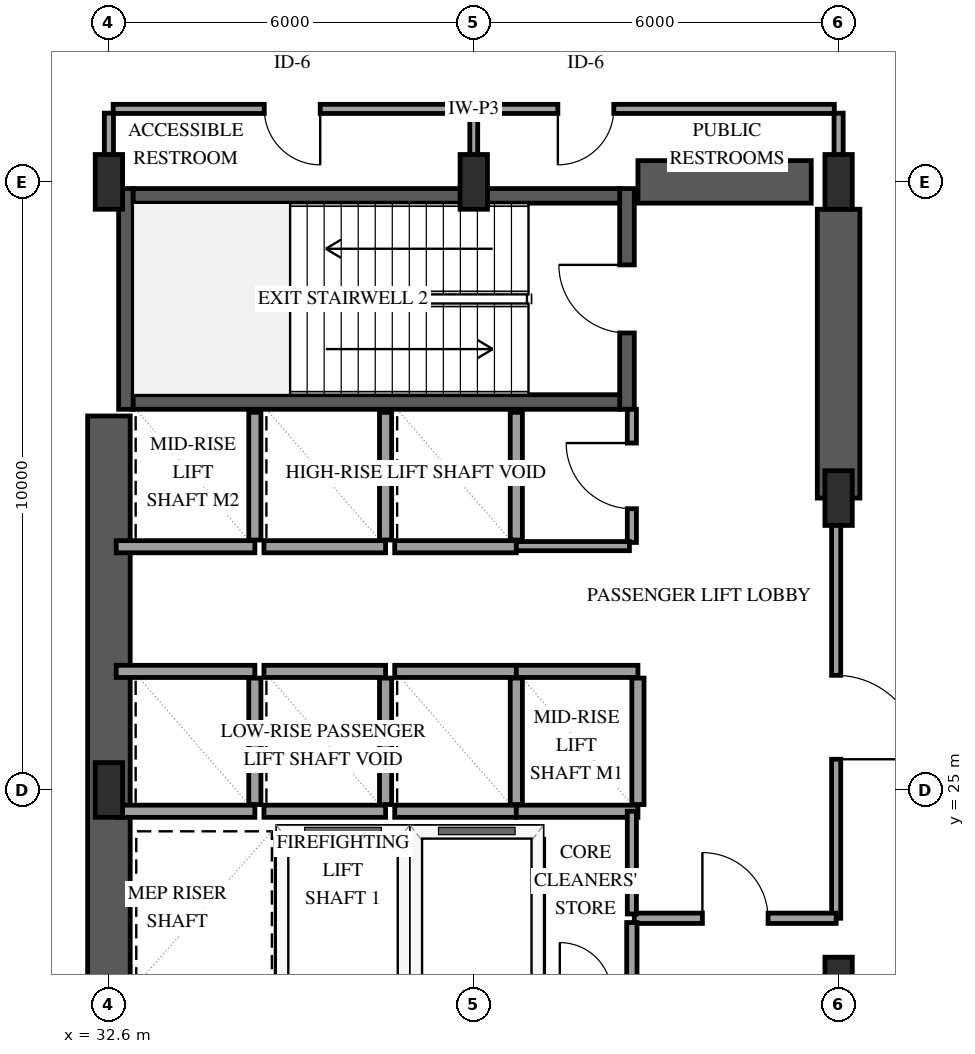
"""IFC4 building model, lengths in metres.
Left out: names, types, materials, properties, quantities, classifications, styles, units other than length and angle.
Written with IfcOpenShell. Run it as: python <this file> out.ifc"""

import sys

from ifc_helpers import new_model, si_unit, direction, frame, frame_2d, origin, origin_2d, place, context, subcontext, project, spatial, rectangle, extrude, element, fill, save


model = new_model("IFC4")
c1 = context("Model", 3, precision=1e-05, world=origin(), true_north=direction((0.0, 1.0)))
c2 = subcontext(c1, "Body", "Model", "MODEL_VIEW")
j1 = project(units=[si_unit("LENGTHUNIT", "METRE"), si_unit("PLANEANGLEUNIT", "RADIAN")], contexts=[c1])
p1 = place(None, origin())
s1 = spatial("IfcSite", under=j1, at=p1, CompositionType="ELEMENT")
p2 = place(p1, origin())
s2 = spatial("IfcBuilding", under=s1, at=p2, CompositionType="ELEMENT")
p3 = place(p2, frame((0.0, 0.0, 6.0)))
s3 = spatial("IfcBuildingStorey", under=s2, at=p3, CompositionType="ELEMENT", Elevation=6.0)
p4 = place(p3, frame((32.88, 31.26, 0.0), z_axis=(0.0, 0.0, 1.0), x_axis=(0.0, 1.0, 0.0)))
e1 = element("IfcWall", 1, at=p4, inside=s3, PredefinedType="SHEAR", context=c2, shape_type="SweptSolid", body=[
    extrude(rectangle(XDim=3.63, YDim=0.24, at=frame_2d((1.815, 0.0))), origin(), (0.0, 0.0, 1.0), 5.4),
])
p5 = place(p3, frame((41.12, 31.26, 0.0), z_axis=(0.0, 0.0, 1.0), x_axis=(0.0, 1.0, 0.0)))
e2 = element("IfcWall", 2, at=p5, inside=s3, PredefinedType="SHEAR", context=c2, shape_type="SweptSolid", body=[
    extrude(rectangle(XDim=3.63, YDim=0.24, at=frame_2d((1.815, 0.0))), origin(), (0.0, 0.0, 1.0), 5.4),
])
p6 = place(p5, frame((1.255, 0.0, 0.0)))
e3 = element("IfcOpeningElement", 3, at=p6, cuts=e2, PredefinedType="OPENING", context=c2, shape_type="SweptSolid", body=[
    extrude(rectangle(XDim=1.12, YDim=2.15, at=frame_2d((0.56, 1.075))), frame((0.0, 0.13, 0.0), z_axis=(0.0, -1.0, 0.0), x_axis=(1.0, 0.0, 0.0)), (0.0, 0.0, 1.0), 0.26),
])
for number, where, z_axis, x_axis in (
    (4, (33.0, 31.38, 0.0), (0.0, 0.0, 1.0), (1.0, 0.0, 0.0)),
    (5, (33.0, 34.77, 0.0), (0.0, 0.0, 1.0), (1.0, 0.0, 0.0)),
):
    element("IfcWall", number, at=place(p3, frame(where, z_axis=z_axis, x_axis=x_axis)), inside=s3, PredefinedType="SHEAR", context=c2, shape_type="SweptSolid", body=[
        extrude(rectangle(XDim=8.0, YDim=0.24, at=frame_2d((4.0, 0.0))), origin(), (0.0, 0.0, 1.0), 5.4),
    ])
p7 = place(p3, frame((32.6, 18.85, 0.0), z_axis=(0.0, 0.0, 1.0), x_axis=(0.0, 1.0, 0.0)))
e6 = element("IfcWall", 6, at=p7, inside=s3, PredefinedType="SHEAR", context=c2, shape_type="SweptSolid", body=[
    extrude(rectangle(XDim=12.3, YDim=0.7, at=frame_2d((6.15, 0.0))), origin(), (0.0, 0.0, 1.0), 5.4),
])
p8 = place(p3, frame((41.3, 35.0, 0.0), z_axis=(0.0, 0.0, 1.0), x_axis=(1.0, 0.0, 0.0)))
e7 = element("IfcWall", 7, at=p8, inside=s3, PredefinedType="SHEAR", context=c2, shape_type="SweptSolid", body=[
    extrude(rectangle(XDim=2.85, YDim=0.7, at=frame_2d((1.425, 0.0))), origin(), (0.0, 0.0, 1.0), 5.4),
])
p9 = place(p3, frame((44.6, 29.8, 0.0), z_axis=(0.0, 0.0, 1.0), x_axis=(0.0, 1.0, 0.0)))
e8 = element("IfcWall", 8, at=p9, inside=s3, PredefinedType="SHEAR", context=c2, shape_type="SweptSolid", body=[
    extrude(rectangle(XDim=4.75, YDim=0.7, at=frame_2d((2.375, 0.0))), origin(), (0.0, 0.0, 1.0), 5.4),
])
for number, where, z_axis, x_axis in (
    (9, (32.6, 25.0, 0.0), (0.0, 0.0, 1.0), (1.0, 0.0, 0.0)),
    (10, (32.6, 35.0, 0.0), (0.0, 0.0, 1.0), (1.0, 0.0, 0.0)),
    (11, (38.6, 35.0, 0.0), (0.0, 0.0, 1.0), (1.0, 0.0, 0.0)),
    (12, (44.6, 21.8, 0.0), (0.0, 0.0, 1.0), (1.0, 0.0, 0.0)),
    (13, (44.6, 29.8, 0.0), (0.0, 0.0, 1.0), (1.0, 0.0, 0.0)),
    (14, (44.6, 35.0, 0.0), (0.0, 0.0, 1.0), (1.0, 0.0, 0.0)),
):
    element("IfcColumn", number, at=place(p3, frame(where, z_axis=z_axis, x_axis=x_axis)), inside=s3, PredefinedType="PILASTER", context=c2, shape_type="SweptSolid", body=[
        extrude(rectangle(XDim=0.45, YDim=0.9, at=origin_2d()), origin(), (0.0, 0.0, 1.0), 5.4),
    ])
p10 = place(p3, frame((35.45, 24.3, 0.0), z_axis=(0.0, 0.0, 1.0), x_axis=(1.0, 0.0, 0.0)))
e15 = element("IfcWall", 15, at=p10, inside=s3, PredefinedType="SOLIDWALL", context=c2, shape_type="SweptSolid", body=[
    extrude(rectangle(XDim=2.0, YDim=0.2, at=frame_2d((1.0, 0.0))), origin(), (0.0, 0.0, 1.0), 5.08),
])
for number, where, z_axis, x_axis in (
    (16, (35.45, 21.81, 0.0), (0.0, 0.0, 1.0), (0.0, 1.0, 0.0)),
    (17, (37.45, 21.81, 0.0), (0.0, 0.0, 1.0), (0.0, 1.0, 0.0)),
):
    element("IfcWall", number, at=place(p3, frame(where, z_axis=z_axis, x_axis=x_axis)), inside=s3, PredefinedType="SOLIDWALL", context=c2, shape_type="SweptSolid", body=[
        extrude(rectangle(XDim=2.38, YDim=0.2, at=frame_2d((1.19, 0.0))), origin(), (0.0, 0.0, 1.0), 5.08),
    ])
p11 = place(p3, frame((37.65, 24.3, 0.0), z_axis=(0.0, 0.0, 1.0), x_axis=(1.0, 0.0, 0.0)))
e18 = element("IfcWall", 18, at=p11, inside=s3, PredefinedType="SOLIDWALL", context=c2, shape_type="SweptSolid", body=[
    extrude(rectangle(XDim=2.0, YDim=0.2, at=frame_2d((1.0, 0.0))), origin(), (0.0, 0.0, 1.0), 5.08),
])
p12 = place(p3, frame((39.65, 21.81, 0.0), z_axis=(0.0, 0.0, 1.0), x_axis=(0.0, 1.0, 0.0)))
e19 = element("IfcWall", 19, at=p12, inside=s3, PredefinedType="SOLIDWALL", context=c2, shape_type="SweptSolid", body=[
    extrude(rectangle(XDim=2.38, YDim=0.2, at=frame_2d((1.19, 0.0))), origin(), (0.0, 0.0, 1.0), 5.08),
])
for number, where, z_axis, x_axis in (
    (20, (32.72, 24.65, 0.0), (0.0, 0.0, 1.0), (1.0, 0.0, 0.0)),
    (21, (32.72, 26.95, 0.0), (0.0, 0.0, 1.0), (1.0, 0.0, 0.0)),
):
    element("IfcWall", number, at=place(p3, frame(where, z_axis=z_axis, x_axis=x_axis)), inside=s3, PredefinedType="SOLIDWALL", context=c2, shape_type="SweptSolid", body=[
        extrude(rectangle(XDim=2.28, YDim=0.2, at=frame_2d((1.14, 0.0))), origin(), (0.0, 0.0, 1.0), 5.08),
    ])
p13 = place(p3, frame((35.0, 24.76, 0.0), z_axis=(0.0, 0.0, 1.0), x_axis=(0.0, 1.0, 0.0)))
e22 = element("IfcWall", 22, at=p13, inside=s3, PredefinedType="SOLIDWALL", context=c2, shape_type="SweptSolid", body=[
    extrude(rectangle(XDim=2.08, YDim=0.2, at=frame_2d((1.04, 0.0))), origin(), (0.0, 0.0, 1.0), 5.08),
])
for number, where, z_axis, x_axis in (
    (23, (35.15, 24.65, 0.0), (0.0, 0.0, 1.0), (1.0, 0.0, 0.0)),
    (24, (35.15, 26.95, 0.0), (0.0, 0.0, 1.0), (1.0, 0.0, 0.0)),
):
    element("IfcWall", number, at=place(p3, frame(where, z_axis=z_axis, x_axis=x_axis)), inside=s3, PredefinedType="SOLIDWALL", context=c2, shape_type="SweptSolid", body=[
        extrude(rectangle(XDim=2.0, YDim=0.2, at=frame_2d((1.0, 0.0))), origin(), (0.0, 0.0, 1.0), 5.08),
    ])
p14 = place(p3, frame((37.15, 24.76, 0.0), z_axis=(0.0, 0.0, 1.0), x_axis=(0.0, 1.0, 0.0)))
e25 = element("IfcWall", 25, at=p14, inside=s3, PredefinedType="SOLIDWALL", context=c2, shape_type="SweptSolid", body=[
    extrude(rectangle(XDim=2.08, YDim=0.2, at=frame_2d((1.04, 0.0))), origin(), (0.0, 0.0, 1.0), 5.08),
])
for number, where, z_axis, x_axis in (
    (26, (37.3, 24.65, 0.0), (0.0, 0.0, 1.0), (1.0, 0.0, 0.0)),
    (27, (37.3, 26.95, 0.0), (0.0, 0.0, 1.0), (1.0, 0.0, 0.0)),
):
    element("IfcWall", number, at=place(p3, frame(where, z_axis=z_axis, x_axis=x_axis)), inside=s3, PredefinedType="SOLIDWALL", context=c2, shape_type="SweptSolid", body=[
        extrude(rectangle(XDim=2.0, YDim=0.2, at=frame_2d((1.0, 0.0))), origin(), (0.0, 0.0, 1.0), 5.08),
    ])
p15 = place(p3, frame((39.3, 24.76, 0.0), z_axis=(0.0, 0.0, 1.0), x_axis=(0.0, 1.0, 0.0)))
e28 = element("IfcWall", 28, at=p15, inside=s3, PredefinedType="SOLIDWALL", context=c2, shape_type="SweptSolid", body=[
    extrude(rectangle(XDim=2.08, YDim=0.2, at=frame_2d((1.04, 0.0))), origin(), (0.0, 0.0, 1.0), 5.08),
])
for number, where, z_axis, x_axis in (
    (29, (39.3, 24.65, 0.0), (0.0, 0.0, 1.0), (1.0, 0.0, 0.0)),
    (30, (39.3, 26.95, 0.0), (0.0, 0.0, 1.0), (1.0, 0.0, 0.0)),
):
    element("IfcWall", number, at=place(p3, frame(where, z_axis=z_axis, x_axis=x_axis)), inside=s3, PredefinedType="SOLIDWALL", context=c2, shape_type="SweptSolid", body=[
        extrude(rectangle(XDim=2.0, YDim=0.2, at=frame_2d((1.0, 0.0))), origin(), (0.0, 0.0, 1.0), 5.08),
    ])
p16 = place(p3, frame((41.3, 24.76, 0.0), z_axis=(0.0, 0.0, 1.0), x_axis=(0.0, 1.0, 0.0)))
e31 = element("IfcWall", 31, at=p16, inside=s3, PredefinedType="SOLIDWALL", context=c2, shape_type="SweptSolid", body=[
    extrude(rectangle(XDim=2.08, YDim=0.2, at=frame_2d((1.04, 0.0))), origin(), (0.0, 0.0, 1.0), 5.08),
])
p17 = place(p3, frame((32.72, 29.0, 0.0), z_axis=(0.0, 0.0, 1.0), x_axis=(1.0, 0.0, 0.0)))
e32 = element("IfcWall", 32, at=p17, inside=s3, PredefinedType="SOLIDWALL", context=c2, shape_type="SweptSolid", body=[
    extrude(rectangle(XDim=2.28, YDim=0.2, at=frame_2d((1.14, 0.0))), origin(), (0.0, 0.0, 1.0), 5.08),
])
p18 = place(p3, frame((35.0, 29.11, 0.0), z_axis=(0.0, 0.0, 1.0), x_axis=(0.0, 1.0, 0.0)))
e33 = element("IfcWall", 33, at=p18, inside=s3, PredefinedType="SOLIDWALL", context=c2, shape_type="SweptSolid", body=[
    extrude(rectangle(XDim=2.1, YDim=0.2, at=frame_2d((1.05, 0.0))), origin(), (0.0, 0.0, 1.0), 5.08),
])
p19 = place(p3, frame((35.15, 29.0, 0.0), z_axis=(0.0, 0.0, 1.0), x_axis=(1.0, 0.0, 0.0)))
e34 = element("IfcWall", 34, at=p19, inside=s3, PredefinedType="SOLIDWALL", context=c2, shape_type="SweptSolid", body=[
    extrude(rectangle(XDim=2.0, YDim=0.2, at=frame_2d((1.0, 0.0))), origin(), (0.0, 0.0, 1.0), 5.08),
])
p20 = place(p3, frame((37.15, 29.11, 0.0), z_axis=(0.0, 0.0, 1.0), x_axis=(0.0, 1.0, 0.0)))
e35 = element("IfcWall", 35, at=p20, inside=s3, PredefinedType="SOLIDWALL", context=c2, shape_type="SweptSolid", body=[
    extrude(rectangle(XDim=2.1, YDim=0.2, at=frame_2d((1.05, 0.0))), origin(), (0.0, 0.0, 1.0), 5.08),
])
p21 = place(p3, frame((37.3, 29.0, 0.0), z_axis=(0.0, 0.0, 1.0), x_axis=(1.0, 0.0, 0.0)))
e36 = element("IfcWall", 36, at=p21, inside=s3, PredefinedType="SOLIDWALL", context=c2, shape_type="SweptSolid", body=[
    extrude(rectangle(XDim=2.0, YDim=0.2, at=frame_2d((1.0, 0.0))), origin(), (0.0, 0.0, 1.0), 5.08),
])
p22 = place(p3, frame((39.3, 29.11, 0.0), z_axis=(0.0, 0.0, 1.0), x_axis=(0.0, 1.0, 0.0)))
e37 = element("IfcWall", 37, at=p22, inside=s3, PredefinedType="SOLIDWALL", context=c2, shape_type="SweptSolid", body=[
    extrude(rectangle(XDim=2.1, YDim=0.2, at=frame_2d((1.05, 0.0))), origin(), (0.0, 0.0, 1.0), 5.08),
])
p23 = place(p3, frame((44.56, 29.8, 0.0), z_axis=(0.0, 0.0, 1.0), x_axis=(0.0, -1.0, 0.0)))
e38 = element("IfcWall", 38, at=p23, inside=s3, PredefinedType="PARTITIONING", context=c2, shape_type="SweptSolid", body=[
    extrude(rectangle(XDim=6.91, YDim=0.15, at=frame_2d((3.455, 0.0))), origin(), (0.0, 0.0, 1.0), 4.12),
])
p24 = place(p23, frame((2.915, 0.0, 0.0)))
e39 = element("IfcOpeningElement", 39, at=p24, cuts=e38, PredefinedType="OPENING", context=c2, shape_type="SweptSolid", body=[
    extrude(rectangle(XDim=1.38, YDim=2.2, at=frame_2d((0.69, 1.1))), frame((0.0, 0.085, 0.0), z_axis=(0.0, -1.0, 0.0), x_axis=(1.0, 0.0, 0.0)), (0.0, 0.0, 1.0), 0.17),
])
p25 = place(p3, frame((38.53, 36.2, 0.0), z_axis=(0.0, 0.0, 1.0), x_axis=(-1.0, 0.0, 0.0)))
e40 = element("IfcWall", 40, at=p25, inside=s3, PredefinedType="PARTITIONING", context=c2, shape_type="SweptSolid", body=[
    extrude(rectangle(XDim=5.86, YDim=0.15, at=frame_2d((2.93, 0.0))), origin(), (0.0, 0.0, 1.0), 5.08),
])
p26 = place(p25, frame((2.455, 0.0, 0.0)))
e41 = element("IfcOpeningElement", 41, at=p26, cuts=e40, PredefinedType="OPENING", context=c2, shape_type="SweptSolid", body=[
    extrude(rectangle(XDim=0.92, YDim=2.12, at=frame_2d((0.46, 1.06))), frame((0.0, 0.085, 0.0), z_axis=(0.0, -1.0, 0.0), x_axis=(1.0, 0.0, 0.0)), (0.0, 0.0, 1.0), 0.17),
])
p27 = place(p3, frame((44.53, 36.2, 0.0), z_axis=(0.0, 0.0, 1.0), x_axis=(-1.0, 0.0, 0.0)))
e42 = element("IfcWall", 42, at=p27, inside=s3, PredefinedType="PARTITIONING", context=c2, shape_type="SweptSolid", body=[
    extrude(rectangle(XDim=5.86, YDim=0.15, at=frame_2d((2.93, 0.0))), origin(), (0.0, 0.0, 1.0), 5.08),
])
p28 = place(p27, frame((3.627, 0.0, 0.0)))
e43 = element("IfcOpeningElement", 43, at=p28, cuts=e42, PredefinedType="OPENING", context=c2, shape_type="SweptSolid", body=[
    extrude(rectangle(XDim=0.92, YDim=2.12, at=frame_2d((0.46, 1.06))), frame((0.0, 0.085, 0.0), z_axis=(0.0, -1.0, 0.0), x_axis=(1.0, 0.0, 0.0)), (0.0, 0.0, 1.0), 0.17),
])
p29 = place(p3, frame((41.24, 22.89, 0.0), z_axis=(0.0, 0.0, 1.0), x_axis=(1.0, 0.0, 0.0)))
e44 = element("IfcWall", 44, at=p29, inside=s3, PredefinedType="PARTITIONING", context=c2, shape_type="SweptSolid", body=[
    extrude(rectangle(XDim=3.32, YDim=0.17, at=frame_2d((1.66, 0.0))), origin(), (0.0, 0.0, 1.0), 5.08),
])
p30 = place(p29, frame((1.12, 0.0, 0.0)))
e45 = element("IfcOpeningElement", 45, at=p30, cuts=e44, PredefinedType="OPENING", context=c2, shape_type="SweptSolid", body=[
    extrude(rectangle(XDim=1.08, YDim=2.15, at=frame_2d((0.54, 1.075))), frame((0.0, 0.095, 0.0), z_axis=(0.0, -1.0, 0.0), x_axis=(1.0, 0.0, 0.0)), (0.0, 0.0, 1.0), 0.19),
])
p31 = place(p3, frame((41.2, 29.07, 0.0), z_axis=(0.0, 0.0, 1.0), x_axis=(0.0, 1.0, 0.0)))
e46 = element("IfcWall", 46, at=p31, inside=s3, PredefinedType="PARTITIONING", context=c2, shape_type="SweptSolid", body=[
    extrude(rectangle(XDim=2.19, YDim=0.15, at=frame_2d((1.095, 0.0))), origin(), (0.0, 0.0, 1.0), 5.08),
])
p32 = place(p31, frame((0.555, 0.0, 0.0)))
e47 = element("IfcOpeningElement", 47, at=p32, cuts=e46, PredefinedType="OPENING", context=c2, shape_type="SweptSolid", body=[
    extrude(rectangle(XDim=1.08, YDim=2.15, at=frame_2d((0.54, 1.075))), frame((0.0, 0.085, 0.0), z_axis=(0.0, -1.0, 0.0), x_axis=(1.0, 0.0, 0.0)), (0.0, 0.0, 1.0), 0.17),
])
p33 = place(p3, frame((39.3, 29.01, 0.0), z_axis=(0.0, 0.0, 1.0), x_axis=(1.0, 0.0, 0.0)))
e48 = element("IfcWall", 48, at=p33, inside=s3, PredefinedType="PARTITIONING", context=c2, shape_type="SweptSolid", body=[
    extrude(rectangle(XDim=1.86, YDim=0.15, at=frame_2d((0.93, 0.0))), origin(), (0.0, 0.0, 1.0), 5.08),
])
p34 = place(p3, frame((41.2, 22.96, 0.0), z_axis=(0.0, 0.0, 1.0), x_axis=(0.0, 1.0, 0.0)))
e49 = element("IfcWall", 49, at=p34, inside=s3, PredefinedType="PARTITIONING", context=c2, shape_type="SweptSolid", body=[
    extrude(rectangle(XDim=1.69, YDim=0.15, at=frame_2d((0.845, 0.0))), origin(), (0.0, 0.0, 1.0), 5.08),
])
p35 = place(p3, frame((41.2, 21.7, 0.0), z_axis=(0.0, 0.0, 1.0), x_axis=(0.0, 1.0, 0.0)))
e50 = element("IfcWall", 50, at=p35, inside=s3, PredefinedType="PARTITIONING", context=c2, shape_type="SweptSolid", body=[
    extrude(rectangle(XDim=1.12, YDim=0.17, at=frame_2d((0.56, 0.0))), origin(), (0.0, 0.0, 1.0), 5.08),
])
for number, where, z_axis, x_axis in (
    (51, (32.6, 36.13, 0.0), (0.0, 0.0, 1.0), (0.0, -1.0, 0.0)),
    (52, (44.6, 35.07, 0.0), (0.0, 0.0, 1.0), (0.0, 1.0, 0.0)),
):
    element("IfcWall", number, at=place(p3, frame(where, z_axis=z_axis, x_axis=x_axis)), inside=s3, PredefinedType="PARTITIONING", context=c2, shape_type="SweptSolid", body=[
        extrude(rectangle(XDim=1.06, YDim=0.15, at=frame_2d((0.53, 0.0))), origin(), (0.0, 0.0, 1.0), 4.202),
    ])
p36 = place(p3, frame((38.6, 36.13, 0.0), z_axis=(0.0, 0.0, 1.0), x_axis=(0.0, -1.0, 0.0)))
e53 = element("IfcWall", 53, at=p36, inside=s3, PredefinedType="PARTITIONING", context=c2, shape_type="SweptSolid", body=[
    extrude(rectangle(XDim=1.06, YDim=0.13, at=frame_2d((0.53, 0.0))), origin(), (0.0, 0.0, 1.0), 5.08),
])
p37 = place(p6, origin())
e54 = element("IfcDoor", 54, at=p37, inside=s3, OperationType="SINGLE_SWING_RIGHT", PredefinedType="DOOR", context=c2, shape_type="SweptSolid", body=[
    extrude(rectangle(XDim=1.12, YDim=2.15, at=frame_2d((0.56, 1.075))), frame((0.0, 0.025, 0.0), z_axis=(0.0, -1.0, 0.0), x_axis=(1.0, 0.0, 0.0)), (0.0, 0.0, 1.0), 0.05),
])
fill(e3, e54)
p38 = place(p24, origin())
e55 = element("IfcDoor", 55, at=p38, inside=s3, OperationType="SINGLE_SWING_RIGHT", PredefinedType="DOOR", context=c2, shape_type="SweptSolid", body=[
    extrude(rectangle(XDim=1.38, YDim=2.2, at=frame_2d((0.69, 1.1))), frame((0.0, 0.025, 0.0), z_axis=(0.0, -1.0, 0.0), x_axis=(1.0, 0.0, 0.0)), (0.0, 0.0, 1.0), 0.05),
])
fill(e39, e55)
p39 = place(p26, origin())
e56 = element("IfcDoor", 56, at=p39, inside=s3, OperationType="SINGLE_SWING_LEFT", PredefinedType="DOOR", context=c2, shape_type="SweptSolid", body=[
    extrude(rectangle(XDim=0.92, YDim=2.12, at=frame_2d((0.46, 1.06))), frame((0.0, 0.025, 0.0), z_axis=(0.0, -1.0, 0.0), x_axis=(1.0, 0.0, 0.0)), (0.0, 0.0, 1.0), 0.05),
])
fill(e41, e56)
p40 = place(p28, origin())
e57 = element("IfcDoor", 57, at=p40, inside=s3, OperationType="SINGLE_SWING_RIGHT", PredefinedType="DOOR", context=c2, shape_type="SweptSolid", body=[
    extrude(rectangle(XDim=0.92, YDim=2.12, at=frame_2d((0.46, 1.06))), frame((0.0, 0.025, 0.0), z_axis=(0.0, -1.0, 0.0), x_axis=(1.0, 0.0, 0.0)), (0.0, 0.0, 1.0), 0.05),
])
fill(e43, e57)
p41 = place(p30, origin())
e58 = element("IfcDoor", 58, at=p41, inside=s3, OperationType="SINGLE_SWING_LEFT", PredefinedType="DOOR", context=c2, shape_type="SweptSolid", body=[
    extrude(rectangle(XDim=1.08, YDim=2.15, at=frame_2d((0.54, 1.075))), frame((0.0, 0.025, 0.0), z_axis=(0.0, -1.0, 0.0), x_axis=(1.0, 0.0, 0.0)), (0.0, 0.0, 1.0), 0.05),
])
fill(e45, e58)
p42 = place(p32, origin())
e59 = element("IfcDoor", 59, at=p42, inside=s3, OperationType="SINGLE_SWING_RIGHT", PredefinedType="DOOR", context=c2, shape_type="SweptSolid", body=[
    extrude(rectangle(XDim=1.08, YDim=2.15, at=frame_2d((0.54, 1.075))), frame((0.0, 0.025, 0.0), z_axis=(0.0, -1.0, 0.0), x_axis=(1.0, 0.0, 0.0)), (0.0, 0.0, 1.0), 0.05),
])
fill(e47, e59)
save(model, sys.argv[1])
